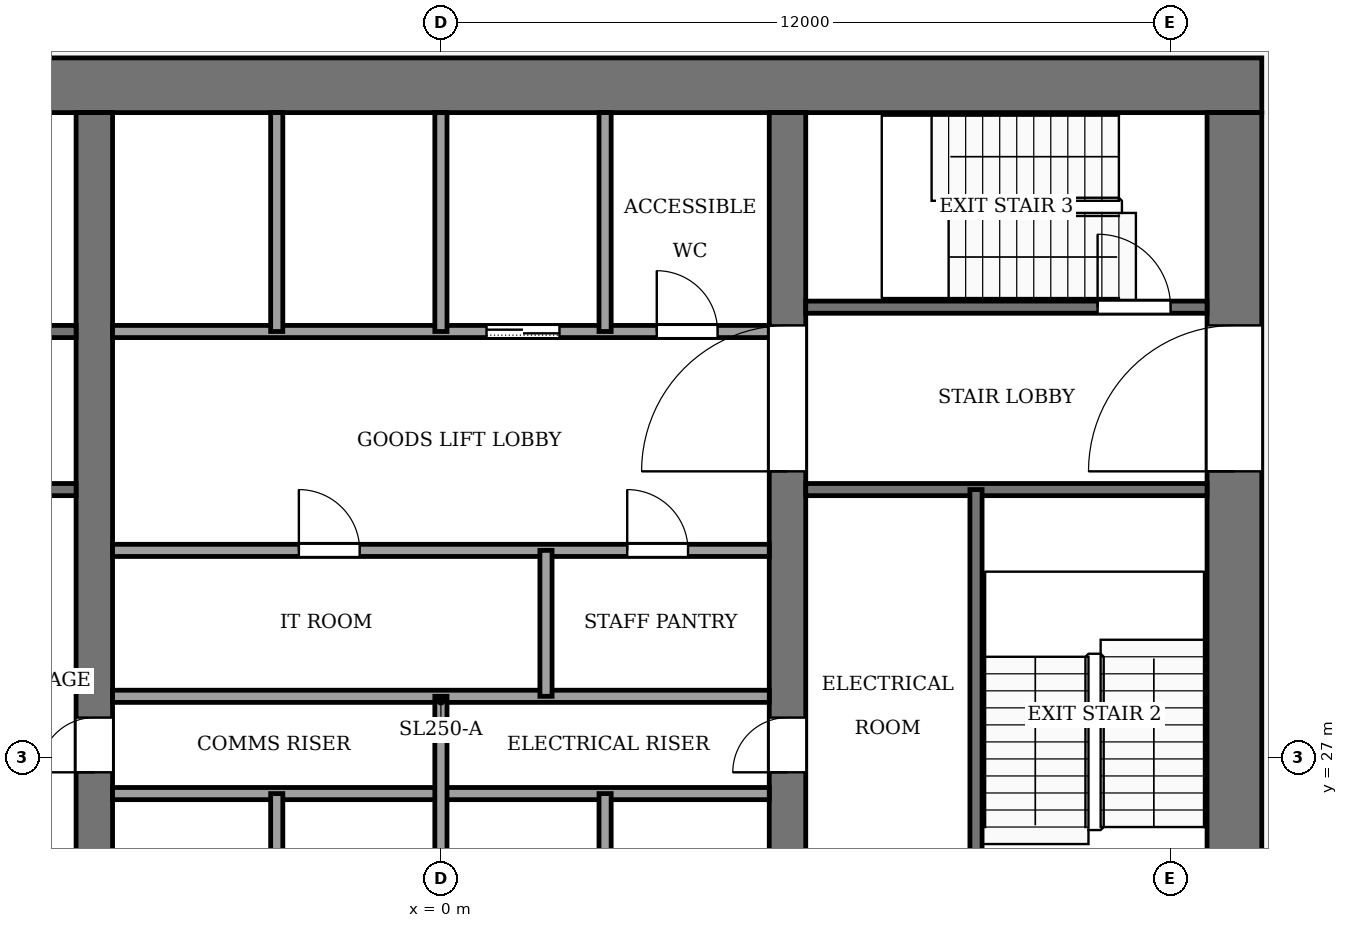
"""IFC4 building model, lengths in metres.
Left out: names, types, materials, properties, quantities, classifications, styles, units other than length and angle.
Written with IfcOpenShell. Run it as: python <this file> out.ifc"""

import sys

from ifc_helpers import new_model, si_unit, direction, frame, frame_2d, origin, place, context, subcontext, project, spatial, rectangle, extrude, element, fill, save


model = new_model("IFC4")
c1 = context("Model", 3, precision=1e-05, world=origin(), true_north=direction((0.0, 1.0)))
c2 = subcontext(c1, "Body", "Model", "MODEL_VIEW")
j1 = project(units=[si_unit("LENGTHUNIT", "METRE"), si_unit("PLANEANGLEUNIT", "RADIAN")], contexts=[c1])
p1 = place(None, origin())
s1 = spatial("IfcSite", under=j1, at=p1, CompositionType="ELEMENT")
p2 = place(p1, origin())
s2 = spatial("IfcBuilding", under=s1, at=p2, CompositionType="ELEMENT")
p3 = place(p2, frame((0.0, 0.0, 186.0)))
s3 = spatial("IfcBuildingStorey", under=s2, at=p3, CompositionType="ELEMENT", Elevation=186.0)
p4 = place(p3, frame((-13.5, 38.05, -0.13), z_axis=(0.0, 0.0, 1.0), x_axis=(1.0, 0.0, 0.0)))
e1 = element("IfcWall", 1, at=p4, inside=s3, PredefinedType="SHEAR", context=c2, shape_type="SweptSolid", body=[
    extrude(rectangle(XDim=27.0, YDim=0.9, at=frame_2d((13.5, 0.0))), origin(), (0.0, 0.0, 1.0), 4.0),
])
p5 = place(p3, frame((13.05, 18.4, -0.13), z_axis=(0.0, 0.0, 1.0), x_axis=(0.0, 1.0, 0.0)))
e2 = element("IfcWall", 2, at=p5, inside=s3, PredefinedType="SHEAR", context=c2, shape_type="SweptSolid", body=[
    extrude(rectangle(XDim=19.2, YDim=0.9, at=frame_2d((9.6, 0.0))), origin(), (0.0, 0.0, 1.0), 4.0),
])
p6 = place(p5, frame((2.8, 0.0, 0.13)))
e3 = element("IfcOpeningElement", 3, at=p6, cuts=e2, PredefinedType="OPENING", context=c2, shape_type="SweptSolid", body=[
    extrude(rectangle(XDim=2.4, YDim=2.4, at=frame_2d((1.2, 1.2))), frame((0.0, 0.46, 0.0), z_axis=(0.0, -1.0, 0.0), x_axis=(1.0, 0.0, 0.0)), (0.0, 0.0, 1.0), 0.92),
])
p7 = place(p5, frame((13.3, 0.0, 0.13)))
e4 = element("IfcOpeningElement", 4, at=p7, cuts=e2, PredefinedType="OPENING", context=c2, shape_type="SweptSolid", body=[
    extrude(rectangle(XDim=2.4, YDim=2.4, at=frame_2d((1.2, 1.2))), frame((0.0, 0.46, 0.0), z_axis=(0.0, -1.0, 0.0), x_axis=(1.0, 0.0, 0.0)), (0.0, 0.0, 1.0), 0.92),
])
p8 = place(p3, frame((-5.7, 18.4, -0.13), z_axis=(0.0, 0.0, 1.0), x_axis=(0.0, 1.0, 0.0)))
e5 = element("IfcWall", 5, at=p8, inside=s3, PredefinedType="SHEAR", context=c2, shape_type="SweptSolid", body=[
    extrude(rectangle(XDim=19.2, YDim=0.6, at=frame_2d((9.6, 0.0))), origin(), (0.0, 0.0, 1.0), 4.0),
])
p9 = place(p8, frame((8.35, 0.0, 0.13)))
e6 = element("IfcOpeningElement", 6, at=p9, cuts=e5, PredefinedType="OPENING", context=c2, shape_type="SweptSolid", body=[
    extrude(rectangle(XDim=0.9, YDim=2.1, at=frame_2d((0.45, 1.05))), frame((0.0, 0.31, 0.0), z_axis=(0.0, -1.0, 0.0), x_axis=(1.0, 0.0, 0.0)), (0.0, 0.0, 1.0), 0.62),
])
p10 = place(p3, frame((5.7, 18.4, -0.13), z_axis=(0.0, 0.0, 1.0), x_axis=(0.0, 1.0, 0.0)))
e7 = element("IfcWall", 7, at=p10, inside=s3, PredefinedType="SHEAR", context=c2, shape_type="SweptSolid", body=[
    extrude(rectangle(XDim=19.2, YDim=0.6, at=frame_2d((9.6, 0.0))), origin(), (0.0, 0.0, 1.0), 4.0),
])
p11 = place(p10, frame((8.35, 0.0, 0.13)))
e8 = element("IfcOpeningElement", 8, at=p11, cuts=e7, PredefinedType="OPENING", context=c2, shape_type="SweptSolid", body=[
    extrude(rectangle(XDim=0.9, YDim=2.1, at=frame_2d((0.45, 1.05))), frame((0.0, 0.31, 0.0), z_axis=(0.0, -1.0, 0.0), x_axis=(1.0, 0.0, 0.0)), (0.0, 0.0, 1.0), 0.62),
])
p12 = place(p10, frame((13.3, 0.0, 0.13)))
e9 = element("IfcOpeningElement", 9, at=p12, cuts=e7, PredefinedType="OPENING", context=c2, shape_type="SweptSolid", body=[
    extrude(rectangle(XDim=2.4, YDim=2.4, at=frame_2d((1.2, 1.2))), frame((0.0, 0.31, 0.0), z_axis=(0.0, -1.0, 0.0), x_axis=(1.0, 0.0, 0.0)), (0.0, 0.0, 1.0), 0.62),
])
for number, where, z_axis, x_axis in (
    (10, (-5.4, 26.4, 0.0), (0.0, 0.0, 1.0), (1.0, 0.0, 0.0)),
    (11, (-5.4, 28.0, 0.0), (0.0, 0.0, 1.0), (1.0, 0.0, 0.0)),
):
    element("IfcWall", number, at=place(p3, frame(where, z_axis=z_axis, x_axis=x_axis)), inside=s3, PredefinedType="PARTITIONING", context=c2, shape_type="SweptSolid", body=[
        extrude(rectangle(XDim=10.8, YDim=0.2, at=frame_2d((5.4, 0.0))), origin(), (0.0, 0.0, 1.0), 3.87),
    ])
p13 = place(p3, frame((-5.4, 30.4, 0.0), z_axis=(0.0, 0.0, 1.0), x_axis=(1.0, 0.0, 0.0)))
e12 = element("IfcWall", 12, at=p13, inside=s3, PredefinedType="PARTITIONING", context=c2, shape_type="SweptSolid", body=[
    extrude(rectangle(XDim=10.8, YDim=0.2, at=frame_2d((5.4, 0.0))), origin(), (0.0, 0.0, 1.0), 3.87),
])
p14 = place(p13, frame((3.064, 0.0, 0.0)))
e13 = element("IfcOpeningElement", 13, at=p14, cuts=e12, PredefinedType="OPENING", context=c2, shape_type="SweptSolid", body=[
    extrude(rectangle(XDim=1.0, YDim=2.1, at=frame_2d((0.5, 1.05))), frame((0.0, 0.11, 0.0), z_axis=(0.0, -1.0, 0.0), x_axis=(1.0, 0.0, 0.0)), (0.0, 0.0, 1.0), 0.22),
])
p15 = place(p13, frame((8.464, 0.0, 0.0)))
e14 = element("IfcOpeningElement", 14, at=p15, cuts=e12, PredefinedType="OPENING", context=c2, shape_type="SweptSolid", body=[
    extrude(rectangle(XDim=1.0, YDim=2.1, at=frame_2d((0.5, 1.05))), frame((0.0, 0.11, 0.0), z_axis=(0.0, -1.0, 0.0), x_axis=(1.0, 0.0, 0.0)), (0.0, 0.0, 1.0), 0.22),
])
p16 = place(p3, frame((-12.6, 31.4, 0.0), z_axis=(0.0, 0.0, 1.0), x_axis=(1.0, 0.0, 0.0)))
e15 = element("IfcWall", 15, at=p16, inside=s3, PredefinedType="PARTITIONING", context=c2, shape_type="SweptSolid", body=[
    extrude(rectangle(XDim=6.6, YDim=0.2, at=frame_2d((3.3, 0.0))), origin(), (0.0, 0.0, 1.0), 3.87),
])
p17 = place(p16, frame((1.0, 0.0, 0.0)))
e16 = element("IfcOpeningElement", 16, at=p17, cuts=e15, PredefinedType="OPENING", context=c2, shape_type="SweptSolid", body=[
    extrude(rectangle(XDim=1.2, YDim=2.2, at=frame_2d((0.6, 1.1))), frame((0.0, 0.11, 0.0), z_axis=(0.0, -1.0, 0.0), x_axis=(1.0, 0.0, 0.0)), (0.0, 0.0, 1.0), 0.22),
])
p18 = place(p3, frame((6.0, 31.4, 0.0), z_axis=(0.0, 0.0, 1.0), x_axis=(1.0, 0.0, 0.0)))
e17 = element("IfcWall", 17, at=p18, inside=s3, PredefinedType="PARTITIONING", context=c2, shape_type="SweptSolid", body=[
    extrude(rectangle(XDim=6.6, YDim=0.2, at=frame_2d((3.3, 0.0))), origin(), (0.0, 0.0, 1.0), 3.87),
])
p19 = place(p3, frame((-12.6, 34.0, 0.0), z_axis=(0.0, 0.0, 1.0), x_axis=(1.0, 0.0, 0.0)))
e18 = element("IfcWall", 18, at=p19, inside=s3, PredefinedType="PARTITIONING", context=c2, shape_type="SweptSolid", body=[
    extrude(rectangle(XDim=6.6, YDim=0.2, at=frame_2d((3.3, 0.0))), origin(), (0.0, 0.0, 1.0), 3.87),
])
p20 = place(p19, frame((4.7, 0.0, 0.0)))
e19 = element("IfcOpeningElement", 19, at=p20, cuts=e18, PredefinedType="OPENING", context=c2, shape_type="SweptSolid", body=[
    extrude(rectangle(XDim=1.4, YDim=2.2, at=frame_2d((0.7, 1.1))), frame((0.0, 0.11, 0.0), z_axis=(0.0, -1.0, 0.0), x_axis=(1.0, 0.0, 0.0)), (0.0, 0.0, 1.0), 0.22),
])
p21 = place(p19, frame((2.3, 0.0, 0.0)))
e20 = element("IfcOpeningElement", 20, at=p21, cuts=e18, PredefinedType="OPENING", context=c2, shape_type="SweptSolid", body=[
    extrude(rectangle(XDim=1.4, YDim=2.2, at=frame_2d((0.7, 1.1))), frame((0.0, 0.11, 0.0), z_axis=(0.0, -1.0, 0.0), x_axis=(1.0, 0.0, 0.0)), (0.0, 0.0, 1.0), 0.22),
])
p22 = place(p19, frame((0.45, 0.0, 0.0)))
e21 = element("IfcOpeningElement", 21, at=p22, cuts=e18, PredefinedType="OPENING", context=c2, shape_type="SweptSolid", body=[
    extrude(rectangle(XDim=0.9, YDim=2.1, at=frame_2d((0.45, 1.05))), frame((0.0, 0.11, 0.0), z_axis=(0.0, -1.0, 0.0), x_axis=(1.0, 0.0, 0.0)), (0.0, 0.0, 1.0), 0.22),
])
p23 = place(p3, frame((-5.4, 34.0, 0.0), z_axis=(0.0, 0.0, 1.0), x_axis=(1.0, 0.0, 0.0)))
e22 = element("IfcWall", 22, at=p23, inside=s3, PredefinedType="PARTITIONING", context=c2, shape_type="SweptSolid", body=[
    extrude(rectangle(XDim=10.8, YDim=0.2, at=frame_2d((5.4, 0.0))), origin(), (0.0, 0.0, 1.0), 3.87),
])
p24 = place(p23, frame((6.15, 0.0, 0.0)))
e23 = element("IfcOpeningElement", 23, at=p24, cuts=e22, PredefinedType="OPENING", context=c2, shape_type="SweptSolid", body=[
    extrude(rectangle(XDim=1.2, YDim=2.2, at=frame_2d((0.6, 1.1))), frame((0.0, 0.11, 0.0), z_axis=(0.0, -1.0, 0.0), x_axis=(1.0, 0.0, 0.0)), (0.0, 0.0, 1.0), 0.22),
])
p25 = place(p23, frame((8.95, 0.0, 0.0)))
e24 = element("IfcOpeningElement", 24, at=p25, cuts=e22, PredefinedType="OPENING", context=c2, shape_type="SweptSolid", body=[
    extrude(rectangle(XDim=1.0, YDim=2.1, at=frame_2d((0.5, 1.05))), frame((0.0, 0.11, 0.0), z_axis=(0.0, -1.0, 0.0), x_axis=(1.0, 0.0, 0.0)), (0.0, 0.0, 1.0), 0.22),
])
p26 = place(p3, frame((6.0, 34.4, 0.0), z_axis=(0.0, 0.0, 1.0), x_axis=(1.0, 0.0, 0.0)))
e25 = element("IfcWall", 25, at=p26, inside=s3, PredefinedType="PARTITIONING", context=c2, shape_type="SweptSolid", body=[
    extrude(rectangle(XDim=6.6, YDim=0.2, at=frame_2d((3.3, 0.0))), origin(), (0.0, 0.0, 1.0), 3.87),
])
p27 = place(p26, frame((4.8, 0.0, 0.0)))
e26 = element("IfcOpeningElement", 26, at=p27, cuts=e25, PredefinedType="OPENING", context=c2, shape_type="SweptSolid", body=[
    extrude(rectangle(XDim=1.2, YDim=2.2, at=frame_2d((0.6, 1.1))), frame((0.0, 0.11, 0.0), z_axis=(0.0, -1.0, 0.0), x_axis=(1.0, 0.0, 0.0)), (0.0, 0.0, 1.0), 0.22),
])
p28 = place(p3, frame((-2.7, 24.0, 0.0), z_axis=(0.0, 0.0, 1.0), x_axis=(0.0, 1.0, 0.0)))
e27 = element("IfcWall", 27, at=p28, inside=s3, PredefinedType="PARTITIONING", context=c2, shape_type="SweptSolid", body=[
    extrude(rectangle(XDim=2.4, YDim=0.2, at=frame_2d((1.2, 0.0))), origin(), (0.0, 0.0, 1.0), 3.87),
])
p29 = place(p3, frame((-2.7, 34.0, 0.0), z_axis=(0.0, 0.0, 1.0), x_axis=(0.0, 1.0, 0.0)))
e28 = element("IfcWall", 28, at=p29, inside=s3, PredefinedType="PARTITIONING", context=c2, shape_type="SweptSolid", body=[
    extrude(rectangle(XDim=3.6, YDim=0.2, at=frame_2d((1.8, 0.0))), origin(), (0.0, 0.0, 1.0), 3.87),
])
p30 = place(p3, frame((0.0, 24.0, 0.0), z_axis=(0.0, 0.0, 1.0), x_axis=(0.0, 1.0, 0.0)))
e29 = element("IfcWall", 29, at=p30, inside=s3, PredefinedType="PARTITIONING", context=c2, shape_type="SweptSolid", body=[
    extrude(rectangle(XDim=4.0, YDim=0.2, at=frame_2d((2.0, 0.0))), origin(), (0.0, 0.0, 1.0), 3.87),
])
p31 = place(p3, frame((0.0, 34.0, 0.0), z_axis=(0.0, 0.0, 1.0), x_axis=(0.0, 1.0, 0.0)))
e30 = element("IfcWall", 30, at=p31, inside=s3, PredefinedType="PARTITIONING", context=c2, shape_type="SweptSolid", body=[
    extrude(rectangle(XDim=3.6, YDim=0.2, at=frame_2d((1.8, 0.0))), origin(), (0.0, 0.0, 1.0), 3.87),
])
for number, where, z_axis, x_axis in (
    (31, (1.728, 28.0, 0.0), (0.0, 0.0, 1.0), (0.0, 1.0, 0.0)),
    (32, (2.7, 24.0, 0.0), (0.0, 0.0, 1.0), (0.0, 1.0, 0.0)),
):
    element("IfcWall", number, at=place(p3, frame(where, z_axis=z_axis, x_axis=x_axis)), inside=s3, PredefinedType="PARTITIONING", context=c2, shape_type="SweptSolid", body=[
        extrude(rectangle(XDim=2.4, YDim=0.2, at=frame_2d((1.2, 0.0))), origin(), (0.0, 0.0, 1.0), 3.87),
    ])
p32 = place(p3, frame((2.7, 34.0, 0.0), z_axis=(0.0, 0.0, 1.0), x_axis=(0.0, 1.0, 0.0)))
e33 = element("IfcWall", 33, at=p32, inside=s3, PredefinedType="PARTITIONING", context=c2, shape_type="SweptSolid", body=[
    extrude(rectangle(XDim=3.6, YDim=0.2, at=frame_2d((1.8, 0.0))), origin(), (0.0, 0.0, 1.0), 3.87),
])
p33 = place(p3, frame((8.8, 24.0, 0.0), z_axis=(0.0, 0.0, 1.0), x_axis=(0.0, 1.0, 0.0)))
e34 = element("IfcWall", 34, at=p33, inside=s3, PredefinedType="PARTITIONING", context=c2, shape_type="SweptSolid", body=[
    extrude(rectangle(XDim=7.4, YDim=0.2, at=frame_2d((3.7, 0.0))), origin(), (0.0, 0.0, 1.0), 3.87),
])
p34 = place(p24, origin())
e35 = element("IfcDoor", 35, at=p34, inside=s3, OperationType="SLIDING_TO_LEFT", PredefinedType="DOOR", context=c2, shape_type="SweptSolid", body=[
    extrude(rectangle(XDim=1.2, YDim=2.2, at=frame_2d((0.6, 1.1))), frame((0.0, 0.025, 0.0), z_axis=(0.0, -1.0, 0.0), x_axis=(1.0, 0.0, 0.0)), (0.0, 0.0, 1.0), 0.05),
])
fill(e23, e35)
p35 = place(p14, origin())
e36 = element("IfcDoor", 36, at=p35, inside=s3, OperationType="SINGLE_SWING_RIGHT", PredefinedType="DOOR", context=c2, shape_type="SweptSolid", body=[
    extrude(rectangle(XDim=1.0, YDim=2.1, at=frame_2d((0.5, 1.05))), frame((0.0, 0.025, 0.0), z_axis=(0.0, -1.0, 0.0), x_axis=(1.0, 0.0, 0.0)), (0.0, 0.0, 1.0), 0.05),
])
fill(e13, e36)
p36 = place(p15, origin())
e37 = element("IfcDoor", 37, at=p36, inside=s3, OperationType="SINGLE_SWING_LEFT", PredefinedType="DOOR", context=c2, shape_type="SweptSolid", body=[
    extrude(rectangle(XDim=1.0, YDim=2.1, at=frame_2d((0.5, 1.05))), frame((0.0, 0.025, 0.0), z_axis=(0.0, -1.0, 0.0), x_axis=(1.0, 0.0, 0.0)), (0.0, 0.0, 1.0), 0.05),
])
fill(e14, e37)
p37 = place(p25, origin())
e38 = element("IfcDoor", 38, at=p37, inside=s3, OperationType="SINGLE_SWING_LEFT", PredefinedType="DOOR", context=c2, shape_type="SweptSolid", body=[
    extrude(rectangle(XDim=1.0, YDim=2.1, at=frame_2d((0.5, 1.05))), frame((0.0, 0.025, 0.0), z_axis=(0.0, -1.0, 0.0), x_axis=(1.0, 0.0, 0.0)), (0.0, 0.0, 1.0), 0.05),
])
fill(e24, e38)
p38 = place(p9, origin())
e39 = element("IfcDoor", 39, at=p38, inside=s3, OperationType="SINGLE_SWING_LEFT", PredefinedType="DOOR", context=c2, shape_type="SweptSolid", body=[
    extrude(rectangle(XDim=0.9, YDim=2.1, at=frame_2d((0.45, 1.05))), frame((0.0, 0.025, 0.0), z_axis=(0.0, -1.0, 0.0), x_axis=(1.0, 0.0, 0.0)), (0.0, 0.0, 1.0), 0.05),
])
fill(e6, e39)
p39 = place(p11, origin())
e40 = element("IfcDoor", 40, at=p39, inside=s3, OperationType="SINGLE_SWING_RIGHT", PredefinedType="DOOR", context=c2, shape_type="SweptSolid", body=[
    extrude(rectangle(XDim=0.9, YDim=2.1, at=frame_2d((0.45, 1.05))), frame((0.0, 0.025, 0.0), z_axis=(0.0, -1.0, 0.0), x_axis=(1.0, 0.0, 0.0)), (0.0, 0.0, 1.0), 0.05),
])
fill(e8, e40)
p40 = place(p27, origin())
e41 = element("IfcDoor", 41, at=p40, inside=s3, OperationType="SINGLE_SWING_RIGHT", PredefinedType="DOOR", context=c2, shape_type="SweptSolid", body=[
    extrude(rectangle(XDim=1.2, YDim=2.2, at=frame_2d((0.6, 1.1))), frame((0.0, 0.025, 0.0), z_axis=(0.0, -1.0, 0.0), x_axis=(1.0, 0.0, 0.0)), (0.0, 0.0, 1.0), 0.05),
])
fill(e26, e41)
p41 = place(p12, origin())
e42 = element("IfcDoor", 42, at=p41, inside=s3, OperationType="DOUBLE_DOOR_SINGLE_SWING", PredefinedType="DOOR", context=c2, shape_type="SweptSolid", body=[
    extrude(rectangle(XDim=2.4, YDim=2.4, at=frame_2d((1.2, 1.2))), frame((0.0, 0.025, 0.0), z_axis=(0.0, -1.0, 0.0), x_axis=(1.0, 0.0, 0.0)), (0.0, 0.0, 1.0), 0.05),
])
fill(e9, e42)
p42 = place(p7, origin())
e43 = element("IfcDoor", 43, at=p42, inside=s3, OperationType="DOUBLE_DOOR_SINGLE_SWING", PredefinedType="DOOR", context=c2, shape_type="SweptSolid", body=[
    extrude(rectangle(XDim=2.4, YDim=2.4, at=frame_2d((1.2, 1.2))), frame((0.0, 0.025, 0.0), z_axis=(0.0, -1.0, 0.0), x_axis=(1.0, 0.0, 0.0)), (0.0, 0.0, 1.0), 0.05),
])
fill(e4, e43)
save(model, sys.argv[1])
